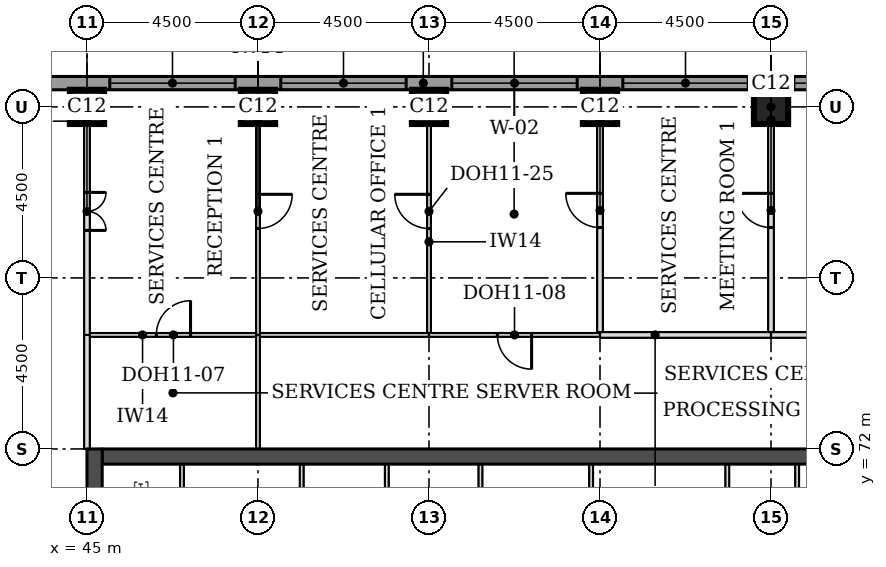
"""IFC4 building model, lengths in metres.
Left out: names, types, materials, properties, quantities, classifications, styles, units other than length and angle.
Written with IfcOpenShell. Run it as: python <this file> out.ifc"""

import sys

from ifc_helpers import new_model, si_unit, direction, frame, frame_2d, origin, origin_2d, place, context, subcontext, project, spatial, rectangle, extrude, element, fill, save


model = new_model("IFC4")
c1 = context("Model", 3, precision=1e-05, world=origin(), true_north=direction((0.0, 1.0)))
c2 = subcontext(c1, "Body", "Model", "MODEL_VIEW")
j1 = project(units=[si_unit("LENGTHUNIT", "METRE"), si_unit("PLANEANGLEUNIT", "RADIAN")], contexts=[c1])
p1 = place(None, origin())
s1 = spatial("IfcSite", under=j1, at=p1, CompositionType="ELEMENT")
p2 = place(p1, origin())
s2 = spatial("IfcBuilding", under=s1, at=p2, CompositionType="ELEMENT")
p3 = place(p2, frame((0.0, 0.0, 234.1)))
s3 = spatial("IfcBuildingStorey", under=s2, at=p3, CompositionType="ELEMENT", Elevation=234.1)
for number, where, z_axis, x_axis in (
    (1, (45.0, 81.0, 0.0), (0.0, 0.0, 1.0), (1.0, 0.0, 0.0)),
    (2, (49.5, 81.0, 0.0), (0.0, 0.0, 1.0), (1.0, 0.0, 0.0)),
    (3, (54.0, 81.0, 0.0), (0.0, 0.0, 1.0), (1.0, 0.0, 0.0)),
    (4, (58.5, 81.0, 0.0), (0.0, 0.0, 1.0), (1.0, 0.0, 0.0)),
    (5, (63.0, 81.0, 0.0), (0.0, 0.0, 1.0), (1.0, 0.0, 0.0)),
):
    element("IfcColumn", number, at=place(p3, frame(where, z_axis=z_axis, x_axis=x_axis)), inside=s3, PredefinedType="COLUMN", context=c2, shape_type="SweptSolid", body=[
        extrude(rectangle(XDim=0.9, YDim=0.9, at=origin_2d()), origin(), (0.0, 0.0, 1.0), 3.7),
    ])
p4 = place(p3, frame((45.4, 71.8, 0.0), z_axis=(0.0, 0.0, 1.0), x_axis=(1.0, 0.0, 0.0)))
e6 = element("IfcWall", 6, at=p4, inside=s3, PredefinedType="SHEAR", context=c2, shape_type="SweptSolid", body=[
    extrude(rectangle(XDim=21.7, YDim=0.4, at=frame_2d((10.85, 0.0))), origin(), (0.0, 0.0, 1.0), 3.7),
])
p5 = place(p3, frame((45.2, 49.5, 0.0), z_axis=(0.0, 0.0, 1.0), x_axis=(0.0, 1.0, 0.0)))
e7 = element("IfcWall", 7, at=p5, inside=s3, PredefinedType="SHEAR", context=c2, shape_type="SweptSolid", body=[
    extrude(rectangle(XDim=22.5, YDim=0.4, at=frame_2d((11.25, 0.0))), origin(), (0.0, 0.0, 1.0), 3.7),
])
p6 = place(p5, frame((4.2, 0.0, 0.0)))
e8 = element("IfcOpeningElement", 8, at=p6, cuts=e7, PredefinedType="OPENING", context=c2, shape_type="SweptSolid", body=[
    extrude(rectangle(XDim=1.8, YDim=2.1, at=frame_2d((0.9, 1.05))), frame((0.0, 0.21, 0.0), z_axis=(0.0, -1.0, 0.0), x_axis=(1.0, 0.0, 0.0)), (0.0, 0.0, 1.0), 0.42),
])
p7 = place(p5, frame((6.9, 0.0, 0.0)))
e9 = element("IfcOpeningElement", 9, at=p7, cuts=e7, PredefinedType="OPENING", context=c2, shape_type="SweptSolid", body=[
    extrude(rectangle(XDim=1.1, YDim=2.1, at=frame_2d((0.55, 1.05))), frame((0.0, 0.21, 0.0), z_axis=(0.0, -1.0, 0.0), x_axis=(1.0, 0.0, 0.0)), (0.0, 0.0, 1.0), 0.42),
])
p8 = place(p5, frame((13.6, 0.0, 0.0)))
e10 = element("IfcOpeningElement", 10, at=p8, cuts=e7, PredefinedType="OPENING", context=c2, shape_type="SweptSolid", body=[
    extrude(rectangle(XDim=1.1, YDim=2.1, at=frame_2d((0.55, 1.05))), frame((0.0, 0.21, 0.0), z_axis=(0.0, -1.0, 0.0), x_axis=(1.0, 0.0, 0.0)), (0.0, 0.0, 1.0), 0.42),
])
p9 = place(p5, frame((16.5, 0.0, 0.0)))
e11 = element("IfcOpeningElement", 11, at=p9, cuts=e7, PredefinedType="OPENING", context=c2, shape_type="SweptSolid", body=[
    extrude(rectangle(XDim=1.8, YDim=2.1, at=frame_2d((0.9, 1.05))), frame((0.0, 0.21, 0.0), z_axis=(0.0, -1.0, 0.0), x_axis=(1.0, 0.0, 0.0)), (0.0, 0.0, 1.0), 0.42),
])
p10 = place(p3, frame((72.331, 81.625, 0.0), z_axis=(0.0, 0.0, 1.0), x_axis=(-1.0, 0.0, 0.0)))
e12 = element("IfcWall", 12, at=p10, inside=s3, PredefinedType="STANDARD", context=c2, shape_type="SweptSolid", body=[
    extrude(rectangle(XDim=32.163, YDim=0.35, at=frame_2d((16.081, 0.0))), origin(), (0.0, 0.0, 1.0), 3.525),
])
p11 = place(p10, frame((5.431, 0.0, 0.9)))
e13 = element("IfcOpeningElement", 13, at=p11, cuts=e12, PredefinedType="OPENING", context=c2, shape_type="SweptSolid", body=[
    extrude(rectangle(XDim=3.3, YDim=1.9, at=frame_2d((1.65, 0.95))), frame((0.0, 0.185, 0.0), z_axis=(0.0, -1.0, 0.0), x_axis=(1.0, 0.0, 0.0)), (0.0, 0.0, 1.0), 0.37),
])
p12 = place(p10, frame((9.931, 0.0, 0.9)))
e14 = element("IfcOpeningElement", 14, at=p12, cuts=e12, PredefinedType="OPENING", context=c2, shape_type="SweptSolid", body=[
    extrude(rectangle(XDim=3.3, YDim=1.9, at=frame_2d((1.65, 0.95))), frame((0.0, 0.185, 0.0), z_axis=(0.0, -1.0, 0.0), x_axis=(1.0, 0.0, 0.0)), (0.0, 0.0, 1.0), 0.37),
])
p13 = place(p10, frame((14.431, 0.0, 0.9)))
e15 = element("IfcOpeningElement", 15, at=p13, cuts=e12, PredefinedType="OPENING", context=c2, shape_type="SweptSolid", body=[
    extrude(rectangle(XDim=3.3, YDim=1.9, at=frame_2d((1.65, 0.95))), frame((0.0, 0.185, 0.0), z_axis=(0.0, -1.0, 0.0), x_axis=(1.0, 0.0, 0.0)), (0.0, 0.0, 1.0), 0.37),
])
p14 = place(p10, frame((18.931, 0.0, 0.9)))
e16 = element("IfcOpeningElement", 16, at=p14, cuts=e12, PredefinedType="OPENING", context=c2, shape_type="SweptSolid", body=[
    extrude(rectangle(XDim=3.3, YDim=1.9, at=frame_2d((1.65, 0.95))), frame((0.0, 0.185, 0.0), z_axis=(0.0, -1.0, 0.0), x_axis=(1.0, 0.0, 0.0)), (0.0, 0.0, 1.0), 0.37),
])
p15 = place(p10, frame((23.431, 0.0, 0.9)))
e17 = element("IfcOpeningElement", 17, at=p15, cuts=e12, PredefinedType="OPENING", context=c2, shape_type="SweptSolid", body=[
    extrude(rectangle(XDim=3.3, YDim=1.9, at=frame_2d((1.65, 0.95))), frame((0.0, 0.185, 0.0), z_axis=(0.0, -1.0, 0.0), x_axis=(1.0, 0.0, 0.0)), (0.0, 0.0, 1.0), 0.37),
])
p16 = place(p3, frame((45.075, 75.0, 0.0), z_axis=(0.0, 0.0, 1.0), x_axis=(1.0, 0.0, 0.0)))
e18 = element("IfcWall", 18, at=p16, inside=s3, PredefinedType="PARTITIONING", context=c2, shape_type="SweptSolid", body=[
    extrude(rectangle(XDim=4.375, YDim=0.1, at=frame_2d((2.188, 0.0))), origin(), (0.0, 0.0, 1.0), 3.55),
])
p17 = place(p16, frame((1.75, 0.0, 0.0)))
e19 = element("IfcOpeningElement", 19, at=p17, cuts=e18, PredefinedType="OPENING", context=c2, shape_type="SweptSolid", body=[
    extrude(rectangle(XDim=0.9, YDim=2.1, at=frame_2d((0.45, 1.05))), frame((0.0, 0.06, 0.0), z_axis=(0.0, -1.0, 0.0), x_axis=(1.0, 0.0, 0.0)), (0.0, 0.0, 1.0), 0.12),
])
p18 = place(p3, frame((49.55, 75.0, 0.0), z_axis=(0.0, 0.0, 1.0), x_axis=(1.0, 0.0, 0.0)))
e20 = element("IfcWall", 20, at=p18, inside=s3, PredefinedType="PARTITIONING", context=c2, shape_type="SweptSolid", body=[
    extrude(rectangle(XDim=4.45, YDim=0.1, at=frame_2d((2.225, 0.0))), origin(), (0.0, 0.0, 1.0), 3.55),
])
p19 = place(p3, frame((54.0, 75.0, 0.0), z_axis=(0.0, 0.0, 1.0), x_axis=(1.0, 0.0, 0.0)))
e21 = element("IfcWall", 21, at=p19, inside=s3, PredefinedType="PARTITIONING", context=c2, shape_type="SweptSolid", body=[
    extrude(rectangle(XDim=4.5, YDim=0.1, at=frame_2d((2.25, 0.0))), origin(), (0.0, 0.0, 1.0), 3.55),
])
p20 = place(p19, frame((1.8, 0.0, 0.0)))
e22 = element("IfcOpeningElement", 22, at=p20, cuts=e21, PredefinedType="OPENING", context=c2, shape_type="SweptSolid", body=[
    extrude(rectangle(XDim=0.9, YDim=2.1, at=frame_2d((0.45, 1.05))), frame((0.0, 0.06, 0.0), z_axis=(0.0, -1.0, 0.0), x_axis=(1.0, 0.0, 0.0)), (0.0, 0.0, 1.0), 0.12),
])
p21 = place(p3, frame((58.5, 75.0, 0.0), z_axis=(0.0, 0.0, 1.0), x_axis=(1.0, 0.0, 0.0)))
e23 = element("IfcWall", 23, at=p21, inside=s3, PredefinedType="PARTITIONING", context=c2, shape_type="SweptSolid", body=[
    extrude(rectangle(XDim=4.5, YDim=0.15, at=frame_2d((2.25, 0.0))), origin(), (0.0, 0.0, 1.0), 3.55),
])
p22 = place(p3, frame((63.0, 75.0, 0.0), z_axis=(0.0, 0.0, 1.0), x_axis=(1.0, 0.0, 0.0)))
e24 = element("IfcWall", 24, at=p22, inside=s3, PredefinedType="PARTITIONING", context=c2, shape_type="SweptSolid", body=[
    extrude(rectangle(XDim=4.425, YDim=0.15, at=frame_2d((2.212, 0.0))), origin(), (0.0, 0.0, 1.0), 3.55),
])
p23 = place(p3, frame((45.0, 72.0, 0.0), z_axis=(0.0, 0.0, 1.0), x_axis=(0.0, 1.0, 0.0)))
e25 = element("IfcWall", 25, at=p23, inside=s3, PredefinedType="PARTITIONING", context=c2, shape_type="SweptSolid", body=[
    extrude(rectangle(XDim=3.0, YDim=0.15, at=frame_2d((1.5, 0.0))), origin(), (0.0, 0.0, 1.0), 3.022),
])
p24 = place(p3, frame((49.5, 72.0, 0.0), z_axis=(0.0, 0.0, 1.0), x_axis=(0.0, 1.0, 0.0)))
e26 = element("IfcWall", 26, at=p24, inside=s3, PredefinedType="PARTITIONING", context=c2, shape_type="SweptSolid", body=[
    extrude(rectangle(XDim=3.0, YDim=0.1, at=frame_2d((1.5, 0.0))), origin(), (0.0, 0.0, 1.0), 3.55),
])
p25 = place(p3, frame((45.0, 75.0, 0.0), z_axis=(0.0, 0.0, 1.0), x_axis=(0.0, 1.0, 0.0)))
e27 = element("IfcWall", 27, at=p25, inside=s3, PredefinedType="PARTITIONING", context=c2, shape_type="SweptSolid", body=[
    extrude(rectangle(XDim=6.45, YDim=0.15, at=frame_2d((3.225, 0.0))), origin(), (0.0, 0.0, 1.0), 3.022),
])
p26 = place(p25, frame((2.75, 0.0, 0.0)))
e28 = element("IfcOpeningElement", 28, at=p26, cuts=e27, PredefinedType="OPENING", context=c2, shape_type="SweptSolid", body=[
    extrude(rectangle(XDim=1.0, YDim=2.1, at=frame_2d((0.5, 1.05))), frame((0.0, 0.085, 0.0), z_axis=(0.0, -1.0, 0.0), x_axis=(1.0, 0.0, 0.0)), (0.0, 0.0, 1.0), 0.17),
])
p27 = place(p3, frame((49.5, 75.0, 0.0), z_axis=(0.0, 0.0, 1.0), x_axis=(0.0, 1.0, 0.0)))
e29 = element("IfcWall", 29, at=p27, inside=s3, PredefinedType="PARTITIONING", context=c2, shape_type="SweptSolid", body=[
    extrude(rectangle(XDim=6.45, YDim=0.1, at=frame_2d((3.225, 0.0))), origin(), (0.0, 0.0, 1.0), 3.55),
])
p28 = place(p27, frame((2.8, 0.0, 0.0)))
e30 = element("IfcOpeningElement", 30, at=p28, cuts=e29, PredefinedType="OPENING", context=c2, shape_type="SweptSolid", body=[
    extrude(rectangle(XDim=0.9, YDim=2.1, at=frame_2d((0.45, 1.05))), frame((0.0, 0.06, 0.0), z_axis=(0.0, -1.0, 0.0), x_axis=(1.0, 0.0, 0.0)), (0.0, 0.0, 1.0), 0.12),
])
p29 = place(p3, frame((54.0, 75.05, 0.0), z_axis=(0.0, 0.0, 1.0), x_axis=(0.0, 1.0, 0.0)))
e31 = element("IfcWall", 31, at=p29, inside=s3, PredefinedType="PARTITIONING", context=c2, shape_type="SweptSolid", body=[
    extrude(rectangle(XDim=6.4, YDim=0.1, at=frame_2d((3.2, 0.0))), origin(), (0.0, 0.0, 1.0), 3.55),
])
p30 = place(p29, frame((2.75, 0.0, 0.0)))
e32 = element("IfcOpeningElement", 32, at=p30, cuts=e31, PredefinedType="OPENING", context=c2, shape_type="SweptSolid", body=[
    extrude(rectangle(XDim=0.9, YDim=2.1, at=frame_2d((0.45, 1.05))), frame((0.0, 0.06, 0.0), z_axis=(0.0, -1.0, 0.0), x_axis=(1.0, 0.0, 0.0)), (0.0, 0.0, 1.0), 0.12),
])
p31 = place(p3, frame((58.5, 75.075, 0.0), z_axis=(0.0, 0.0, 1.0), x_axis=(0.0, 1.0, 0.0)))
e33 = element("IfcWall", 33, at=p31, inside=s3, PredefinedType="PARTITIONING", context=c2, shape_type="SweptSolid", body=[
    extrude(rectangle(XDim=6.375, YDim=0.15, at=frame_2d((3.188, 0.0))), origin(), (0.0, 0.0, 1.0), 3.55),
])
p32 = place(p31, frame((2.75, 0.0, 0.0)))
e34 = element("IfcOpeningElement", 34, at=p32, cuts=e33, PredefinedType="OPENING", context=c2, shape_type="SweptSolid", body=[
    extrude(rectangle(XDim=0.9, YDim=2.1, at=frame_2d((0.45, 1.05))), frame((0.0, 0.085, 0.0), z_axis=(0.0, -1.0, 0.0), x_axis=(1.0, 0.0, 0.0)), (0.0, 0.0, 1.0), 0.17),
])
p33 = place(p3, frame((63.0, 75.075, 0.0), z_axis=(0.0, 0.0, 1.0), x_axis=(0.0, 1.0, 0.0)))
e35 = element("IfcWall", 35, at=p33, inside=s3, PredefinedType="PARTITIONING", context=c2, shape_type="SweptSolid", body=[
    extrude(rectangle(XDim=6.375, YDim=0.15, at=frame_2d((3.188, 0.0))), origin(), (0.0, 0.0, 1.0), 3.55),
])
p34 = place(p33, frame((2.75, 0.0, 0.0)))
e36 = element("IfcOpeningElement", 36, at=p34, cuts=e35, PredefinedType="OPENING", context=c2, shape_type="SweptSolid", body=[
    extrude(rectangle(XDim=0.9, YDim=2.1, at=frame_2d((0.45, 1.05))), frame((0.0, 0.085, 0.0), z_axis=(0.0, -1.0, 0.0), x_axis=(1.0, 0.0, 0.0)), (0.0, 0.0, 1.0), 0.17),
])
for number, where, z_axis, x_axis in (
    (37, (47.5, 68.5, 0.0), (0.0, 0.0, 1.0), (0.0, 1.0, 0.0)),
    (38, (50.65, 68.5, 0.0), (0.0, 0.0, 1.0), (0.0, 1.0, 0.0)),
    (39, (52.89, 68.5, 0.0), (0.0, 0.0, 1.0), (0.0, 1.0, 0.0)),
    (40, (55.354, 68.5, 0.0), (0.0, 0.0, 1.0), (0.0, 1.0, 0.0)),
    (41, (58.266, 68.5, 0.0), (0.0, 0.0, 1.0), (0.0, 1.0, 0.0)),
    (42, (61.85, 68.5, 0.0), (0.0, 0.0, 1.0), (0.0, 1.0, 0.0)),
    (43, (63.688, 68.5, 0.0), (0.0, 0.0, 1.0), (0.0, 1.0, 0.0)),
):
    element("IfcWall", number, at=place(p3, frame(where, z_axis=z_axis, x_axis=x_axis)), inside=s3, PredefinedType="PARTITIONING", context=c2, shape_type="SweptSolid", body=[
        extrude(rectangle(XDim=3.1, YDim=0.1, at=frame_2d((1.55, 0.0))), origin(), (0.0, 0.0, 1.0), 3.55),
    ])
p35 = place(p11, origin())
e44 = element("IfcWindow", 44, at=p35, inside=s3, PartitioningType="SINGLE_PANEL", PredefinedType="WINDOW", context=c2, shape_type="SweptSolid", body=[
    extrude(rectangle(XDim=3.3, YDim=1.9, at=frame_2d((1.65, 0.95))), frame((0.0, 0.085, 0.0), z_axis=(0.0, -1.0, 0.0), x_axis=(1.0, 0.0, 0.0)), (0.0, 0.0, 1.0), 0.06),
])
fill(e13, e44)
p36 = place(p12, origin())
e45 = element("IfcWindow", 45, at=p36, inside=s3, PartitioningType="SINGLE_PANEL", PredefinedType="WINDOW", context=c2, shape_type="SweptSolid", body=[
    extrude(rectangle(XDim=3.3, YDim=1.9, at=frame_2d((1.65, 0.95))), frame((0.0, 0.085, 0.0), z_axis=(0.0, -1.0, 0.0), x_axis=(1.0, 0.0, 0.0)), (0.0, 0.0, 1.0), 0.06),
])
fill(e14, e45)
p37 = place(p13, origin())
e46 = element("IfcWindow", 46, at=p37, inside=s3, PartitioningType="SINGLE_PANEL", PredefinedType="WINDOW", context=c2, shape_type="SweptSolid", body=[
    extrude(rectangle(XDim=3.3, YDim=1.9, at=frame_2d((1.65, 0.95))), frame((0.0, 0.085, 0.0), z_axis=(0.0, -1.0, 0.0), x_axis=(1.0, 0.0, 0.0)), (0.0, 0.0, 1.0), 0.06),
])
fill(e15, e46)
p38 = place(p14, origin())
e47 = element("IfcWindow", 47, at=p38, inside=s3, PartitioningType="SINGLE_PANEL", PredefinedType="WINDOW", context=c2, shape_type="SweptSolid", body=[
    extrude(rectangle(XDim=3.3, YDim=1.9, at=frame_2d((1.65, 0.95))), frame((0.0, 0.085, 0.0), z_axis=(0.0, -1.0, 0.0), x_axis=(1.0, 0.0, 0.0)), (0.0, 0.0, 1.0), 0.06),
])
fill(e16, e47)
p39 = place(p15, origin())
e48 = element("IfcWindow", 48, at=p39, inside=s3, PartitioningType="SINGLE_PANEL", PredefinedType="WINDOW", context=c2, shape_type="SweptSolid", body=[
    extrude(rectangle(XDim=3.3, YDim=1.9, at=frame_2d((1.65, 0.95))), frame((0.0, 0.085, 0.0), z_axis=(0.0, -1.0, 0.0), x_axis=(1.0, 0.0, 0.0)), (0.0, 0.0, 1.0), 0.06),
])
fill(e17, e48)
p40 = place(p26, frame((1.0, 0.0, 0.0), z_axis=(0.0, 0.0, 1.0), x_axis=(-1.0, 0.0, 0.0)))
e49 = element("IfcDoor", 49, at=p40, inside=s3, OperationType="DOUBLE_DOOR_SINGLE_SWING", PredefinedType="DOOR", context=c2, shape_type="SweptSolid", body=[
    extrude(rectangle(XDim=1.0, YDim=2.1, at=frame_2d((0.5, 1.05))), frame((0.0, 0.025, 0.0), z_axis=(0.0, -1.0, 0.0), x_axis=(1.0, 0.0, 0.0)), (0.0, 0.0, 1.0), 0.05),
])
fill(e28, e49)
p41 = place(p28, frame((0.9, 0.0, 0.0), z_axis=(0.0, 0.0, 1.0), x_axis=(-1.0, 0.0, 0.0)))
e50 = element("IfcDoor", 50, at=p41, inside=s3, OperationType="SINGLE_SWING_LEFT", PredefinedType="DOOR", context=c2, shape_type="SweptSolid", body=[
    extrude(rectangle(XDim=0.9, YDim=2.1, at=frame_2d((0.45, 1.05))), frame((0.0, 0.025, 0.0), z_axis=(0.0, -1.0, 0.0), x_axis=(1.0, 0.0, 0.0)), (0.0, 0.0, 1.0), 0.05),
])
fill(e30, e50)
p42 = place(p30, origin())
e51 = element("IfcDoor", 51, at=p42, inside=s3, OperationType="SINGLE_SWING_RIGHT", PredefinedType="DOOR", context=c2, shape_type="SweptSolid", body=[
    extrude(rectangle(XDim=0.9, YDim=2.1, at=frame_2d((0.45, 1.05))), frame((0.0, 0.025, 0.0), z_axis=(0.0, -1.0, 0.0), x_axis=(1.0, 0.0, 0.0)), (0.0, 0.0, 1.0), 0.05),
])
fill(e32, e51)
p43 = place(p32, origin())
e52 = element("IfcDoor", 52, at=p43, inside=s3, OperationType="SINGLE_SWING_RIGHT", PredefinedType="DOOR", context=c2, shape_type="SweptSolid", body=[
    extrude(rectangle(XDim=0.9, YDim=2.1, at=frame_2d((0.45, 1.05))), frame((0.0, 0.025, 0.0), z_axis=(0.0, -1.0, 0.0), x_axis=(1.0, 0.0, 0.0)), (0.0, 0.0, 1.0), 0.05),
])
fill(e34, e52)
p44 = place(p34, origin())
e53 = element("IfcDoor", 53, at=p44, inside=s3, OperationType="SINGLE_SWING_RIGHT", PredefinedType="DOOR", context=c2, shape_type="SweptSolid", body=[
    extrude(rectangle(XDim=0.9, YDim=2.1, at=frame_2d((0.45, 1.05))), frame((0.0, 0.025, 0.0), z_axis=(0.0, -1.0, 0.0), x_axis=(1.0, 0.0, 0.0)), (0.0, 0.0, 1.0), 0.05),
])
fill(e36, e53)
p45 = place(p17, origin())
e54 = element("IfcDoor", 54, at=p45, inside=s3, OperationType="SINGLE_SWING_RIGHT", PredefinedType="DOOR", context=c2, shape_type="SweptSolid", body=[
    extrude(rectangle(XDim=0.9, YDim=2.1, at=frame_2d((0.45, 1.05))), frame((0.0, 0.025, 0.0), z_axis=(0.0, -1.0, 0.0), x_axis=(1.0, 0.0, 0.0)), (0.0, 0.0, 1.0), 0.05),
])
fill(e19, e54)
p46 = place(p20, frame((0.9, 0.0, 0.0), z_axis=(0.0, 0.0, 1.0), x_axis=(-1.0, 0.0, 0.0)))
e55 = element("IfcDoor", 55, at=p46, inside=s3, OperationType="SINGLE_SWING_LEFT", PredefinedType="DOOR", context=c2, shape_type="SweptSolid", body=[
    extrude(rectangle(XDim=0.9, YDim=2.1, at=frame_2d((0.45, 1.05))), frame((0.0, 0.025, 0.0), z_axis=(0.0, -1.0, 0.0), x_axis=(1.0, 0.0, 0.0)), (0.0, 0.0, 1.0), 0.05),
])
fill(e22, e55)
save(model, sys.argv[1])
